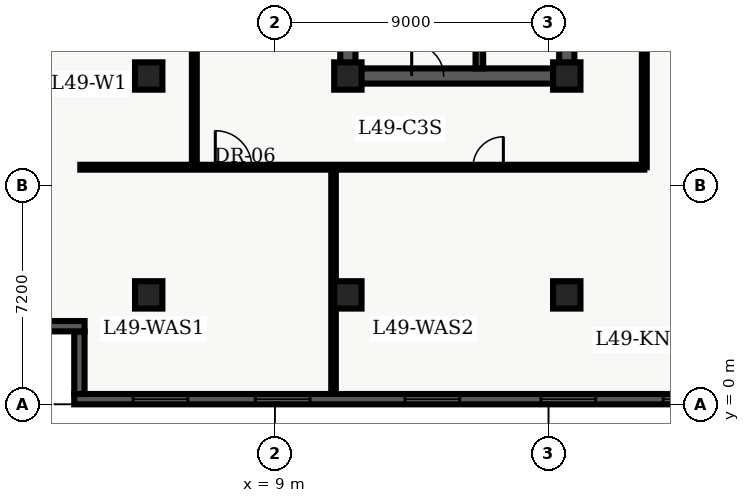
"""IFC4 building model, lengths in metres.
Left out: names, types, materials, properties, quantities, classifications, styles, units other than length and angle.
Written with IfcOpenShell. Run it as: python <this file> out.ifc"""

import sys

from ifc_helpers import new_model, entity, si_unit, converted_unit, direction, frame, origin_with_axes, origin_2d_with_axis, place, context, subcontext, project, spatial, polyline, rectangle, outline, extrude, element, fill, save


model = new_model("IFC4")
c1 = context("Model", 3, precision=1e-05, world=origin_with_axes(), true_north=direction((0.0, 1.0)))
c2 = subcontext(c1, "Body", "Model", "MODEL_VIEW")
j1 = project(units=[si_unit("LENGTHUNIT", "METRE"), converted_unit("PLANEANGLEUNIT", "DEGREE", entity("IfcPlaneAngleMeasure", 0.017), si_unit("PLANEANGLEUNIT", "RADIAN"), dimensions=[0, 0, 0, 0, 0, 0, 0])], contexts=[c1])
p1 = place(None, origin_with_axes())
s1 = spatial("IfcSite", under=j1, at=p1, CompositionType="ELEMENT")
p2 = place(p1, origin_with_axes())
s2 = spatial("IfcBuilding", under=s1, at=p2, CompositionType="ELEMENT")
p3 = place(p2, frame((0.0, 0.0, 200.4), z_axis=(0.0, 0.0, 1.0), x_axis=(1.0, 0.0, 0.0)))
s3 = spatial("IfcBuildingStorey", under=s2, at=p3, CompositionType="ELEMENT", Elevation=200.4)
p4 = place(p3, frame((11.4, 10.8, 0.0), z_axis=(0.0, 0.0, 1.0), x_axis=(0.0, 1.0, 0.0)))
e1 = element("IfcWall", 1, at=p4, inside=s3, PredefinedType="SHEAR", context=c2, shape_type="SweptSolid", body=[
    extrude(outline(polyline([(0.0, -0.25), (27.0, -0.25), (27.0, 0.25), (0.0, 0.25), (0.0, -0.25)])), origin_with_axes(), (0.0, 0.0, 1.0), 3.66),
])
p5 = place(p3, frame((11.4, 10.8, 0.0), z_axis=(0.0, 0.0, 1.0), x_axis=(1.0, 0.0, 0.0)))
e2 = element("IfcWall", 2, at=p5, inside=s3, PredefinedType="SHEAR", context=c2, shape_type="SweptSolid", body=[
    extrude(outline(polyline([(0.0, -0.25), (7.2, -0.25), (7.2, 0.25), (0.0, 0.25), (0.0, -0.25)])), origin_with_axes(), (0.0, 0.0, 1.0), 3.66),
])
p6 = place(p5, frame((2.625, 0.0, 0.0), z_axis=(0.0, 0.0, 1.0), x_axis=(1.0, 0.0, 0.0)))
e3 = element("IfcOpeningElement", 3, at=p6, cuts=e2, PredefinedType="OPENING", context=c2, shape_type="SweptSolid", body=[
    extrude(rectangle(XDim=1.05, YDim=0.52, at=origin_2d_with_axis()), origin_with_axes(), (0.0, 0.0, 1.0), 2.15),
])
p7 = place(p3, frame((18.6, 10.8, 0.0), z_axis=(0.0, 0.0, 1.0), x_axis=(0.0, 1.0, 0.0)))
e4 = element("IfcWall", 4, at=p7, inside=s3, PredefinedType="SHEAR", context=c2, shape_type="SweptSolid", body=[
    extrude(outline(polyline([(0.0, -0.25), (13.5, -0.25), (13.5, 0.25), (0.0, 0.25), (0.0, -0.25)])), origin_with_axes(), (0.0, 0.0, 1.0), 3.66),
])
p8 = place(p7, frame((11.125, 0.0, 0.0), z_axis=(0.0, 0.0, 1.0), x_axis=(1.0, 0.0, 0.0)))
e5 = element("IfcOpeningElement", 5, at=p8, cuts=e4, PredefinedType="OPENING", context=c2, shape_type="SweptSolid", body=[
    extrude(rectangle(XDim=1.05, YDim=0.52, at=origin_2d_with_axis()), origin_with_axes(), (0.0, 0.0, 1.0), 2.15),
])
p9 = place(p7, frame((4.325, 0.0, 0.0), z_axis=(0.0, 0.0, 1.0), x_axis=(1.0, 0.0, 0.0)))
e6 = element("IfcOpeningElement", 6, at=p9, cuts=e4, PredefinedType="OPENING", context=c2, shape_type="SweptSolid", body=[
    extrude(rectangle(XDim=1.05, YDim=0.52, at=origin_2d_with_axis()), origin_with_axes(), (0.0, 0.0, 1.0), 2.15),
])
p10 = place(p3, frame((15.725, 11.05, 0.0), z_axis=(0.0, 0.0, 1.0), x_axis=(0.0, 1.0, 0.0)))
e7 = element("IfcWall", 7, at=p10, inside=s3, PredefinedType="SHEAR", context=c2, shape_type="SweptSolid", body=[
    extrude(outline(polyline([(0.0, -0.125), (8.65, -0.125), (8.65, 0.125), (0.0, 0.125), (0.0, -0.125)])), origin_with_axes(), (0.0, 0.0, 1.0), 3.66),
])
for number, where, z_axis, x_axis in (
    (8, (11.4, 3.6, 0.0), (0.0, 0.0, 1.0), (1.0, 0.0, 0.0)),
    (9, (11.4, 10.8, 0.0), (0.0, 0.0, 1.0), (1.0, 0.0, 0.0)),
    (10, (18.6, 3.6, 0.0), (0.0, 0.0, 1.0), (1.0, 0.0, 0.0)),
    (11, (18.6, 10.8, 0.0), (0.0, 0.0, 1.0), (1.0, 0.0, 0.0)),
    (12, (4.85, 3.6, 0.0), (0.0, 0.0, 1.0), (1.0, 0.0, 0.0)),
    (13, (4.85, 10.8, 0.0), (0.0, 0.0, 1.0), (1.0, 0.0, 0.0)),
):
    element("IfcColumn", number, at=place(p3, frame(where, z_axis=z_axis, x_axis=x_axis)), inside=s3, PredefinedType="COLUMN", context=c2, shape_type="SweptSolid", body=[
        extrude(rectangle(XDim=0.9, YDim=0.9, at=origin_2d_with_axis()), origin_with_axes(), (0.0, 0.0, 1.0), 3.9),
    ])
p11 = place(p3, frame((2.6, 7.8, 0.0), z_axis=(0.0, 0.0, 1.0), x_axis=(1.0, 0.0, 0.0)))
e14 = element("IfcWall", 14, at=p11, inside=s3, PredefinedType="PARTITIONING", context=c2, shape_type="SweptSolid", body=[
    extrude(outline(polyline([(0.0, -0.08), (18.55, -0.08), (18.55, 0.08), (0.0, 0.08), (0.0, -0.08)])), origin_with_axes(), (0.0, 0.0, 1.0), 2.7),
])
p12 = place(p11, frame((5.04, 0.0, 0.0), z_axis=(0.0, 0.0, 1.0), x_axis=(1.0, 0.0, 0.0)))
e15 = element("IfcOpeningElement", 15, at=p12, cuts=e14, PredefinedType="OPENING", context=c2, shape_type="SweptSolid", body=[
    extrude(rectangle(XDim=1.2, YDim=0.18, at=origin_2d_with_axis()), origin_with_axes(), (0.0, 0.0, 1.0), 2.2),
])
p13 = place(p11, frame((13.415, 0.0, 0.0), z_axis=(0.0, 0.0, 1.0), x_axis=(1.0, 0.0, 0.0)))
e16 = element("IfcOpeningElement", 16, at=p13, cuts=e14, PredefinedType="OPENING", context=c2, shape_type="SweptSolid", body=[
    extrude(rectangle(XDim=1.0, YDim=0.18, at=origin_2d_with_axis()), origin_with_axes(), (0.0, 0.0, 1.0), 2.15),
])
p14 = place(p3, frame((21.15, 7.8, 0.0), z_axis=(0.0, 0.0, 1.0), x_axis=(0.0, 1.0, 0.0)))
e17 = element("IfcWall", 17, at=p14, inside=s3, PredefinedType="PARTITIONING", context=c2, shape_type="SweptSolid", body=[
    extrude(outline(polyline([(0.0, -0.08), (32.7, -0.08), (32.7, 0.08), (0.0, 0.08), (0.0, -0.08)])), origin_with_axes(), (0.0, 0.0, 1.0), 2.7),
])
p15 = place(p14, frame((15.589, 0.0, 0.0), z_axis=(0.0, 0.0, 1.0), x_axis=(1.0, 0.0, 0.0)))
e18 = element("IfcOpeningElement", 18, at=p15, cuts=e17, PredefinedType="OPENING", context=c2, shape_type="SweptSolid", body=[
    extrude(rectangle(XDim=1.0, YDim=0.18, at=origin_2d_with_axis()), origin_with_axes(), (0.0, 0.0, 1.0), 2.15),
])
p16 = place(p14, frame((19.026, 0.0, 0.0), z_axis=(0.0, 0.0, 1.0), x_axis=(1.0, 0.0, 0.0)))
e19 = element("IfcOpeningElement", 19, at=p16, cuts=e17, PredefinedType="OPENING", context=c2, shape_type="SweptSolid", body=[
    extrude(rectangle(XDim=1.0, YDim=0.18, at=origin_2d_with_axis()), origin_with_axes(), (0.0, 0.0, 1.0), 2.15),
])
p17 = place(p14, frame((22.849, 0.0, 0.0), z_axis=(0.0, 0.0, 1.0), x_axis=(1.0, 0.0, 0.0)))
e20 = element("IfcOpeningElement", 20, at=p17, cuts=e17, PredefinedType="OPENING", context=c2, shape_type="SweptSolid", body=[
    extrude(rectangle(XDim=1.0, YDim=0.18, at=origin_2d_with_axis()), origin_with_axes(), (0.0, 0.0, 1.0), 2.15),
])
p18 = place(p14, frame((27.204, 0.0, 0.0), z_axis=(0.0, 0.0, 1.0), x_axis=(1.0, 0.0, 0.0)))
e21 = element("IfcOpeningElement", 21, at=p18, cuts=e17, PredefinedType="OPENING", context=c2, shape_type="SweptSolid", body=[
    extrude(rectangle(XDim=1.0, YDim=0.18, at=origin_2d_with_axis()), origin_with_axes(), (0.0, 0.0, 1.0), 2.15),
])
p19 = place(p14, frame((31.042, 0.0, 0.0), z_axis=(0.0, 0.0, 1.0), x_axis=(1.0, 0.0, 0.0)))
e22 = element("IfcOpeningElement", 22, at=p19, cuts=e17, PredefinedType="OPENING", context=c2, shape_type="SweptSolid", body=[
    extrude(rectangle(XDim=1.0, YDim=0.18, at=origin_2d_with_axis()), origin_with_axes(), (0.0, 0.0, 1.0), 2.15),
])
p20 = place(p14, frame((5.775, 0.0, 0.0), z_axis=(0.0, 0.0, 1.0), x_axis=(1.0, 0.0, 0.0)))
e23 = element("IfcOpeningElement", 23, at=p20, cuts=e17, PredefinedType="OPENING", context=c2, shape_type="SweptSolid", body=[
    extrude(rectangle(XDim=1.05, YDim=0.18, at=origin_2d_with_axis()), origin_with_axes(), (0.0, 0.0, 1.0), 2.15),
])
p21 = place(p3, frame((6.35, 7.8, 0.0), z_axis=(0.0, 0.0, 1.0), x_axis=(0.0, 1.0, 0.0)))
e24 = element("IfcWall", 24, at=p21, inside=s3, PredefinedType="PARTITIONING", context=c2, shape_type="SweptSolid", body=[
    extrude(outline(polyline([(0.0, -0.08), (32.7, -0.08), (32.7, 0.08), (0.0, 0.08), (0.0, -0.08)])), origin_with_axes(), (0.0, 0.0, 1.0), 2.7),
])
p22 = place(p21, frame((4.415, 0.0, 0.0), z_axis=(0.0, 0.0, 1.0), x_axis=(1.0, 0.0, 0.0)))
e25 = element("IfcOpeningElement", 25, at=p22, cuts=e24, PredefinedType="OPENING", context=c2, shape_type="SweptSolid", body=[
    extrude(rectangle(XDim=1.0, YDim=0.18, at=origin_2d_with_axis()), origin_with_axes(), (0.0, 0.0, 1.0), 2.15),
])
p23 = place(p21, frame((9.986, 0.0, 0.0), z_axis=(0.0, 0.0, 1.0), x_axis=(1.0, 0.0, 0.0)))
e26 = element("IfcOpeningElement", 26, at=p23, cuts=e24, PredefinedType="OPENING", context=c2, shape_type="SweptSolid", body=[
    extrude(rectangle(XDim=1.0, YDim=0.18, at=origin_2d_with_axis()), origin_with_axes(), (0.0, 0.0, 1.0), 2.15),
])
p24 = place(p21, frame((18.332, 0.0, 0.0), z_axis=(0.0, 0.0, 1.0), x_axis=(1.0, 0.0, 0.0)))
e27 = element("IfcOpeningElement", 27, at=p24, cuts=e24, PredefinedType="OPENING", context=c2, shape_type="SweptSolid", body=[
    extrude(rectangle(XDim=1.0, YDim=0.18, at=origin_2d_with_axis()), origin_with_axes(), (0.0, 0.0, 1.0), 2.15),
])
p25 = place(p21, frame((25.088, 0.0, 0.0), z_axis=(0.0, 0.0, 1.0), x_axis=(1.0, 0.0, 0.0)))
e28 = element("IfcOpeningElement", 28, at=p25, cuts=e24, PredefinedType="OPENING", context=c2, shape_type="SweptSolid", body=[
    extrude(rectangle(XDim=1.0, YDim=0.18, at=origin_2d_with_axis()), origin_with_axes(), (0.0, 0.0, 1.0), 2.15),
])
p26 = place(p21, frame((31.177, 0.0, 0.0), z_axis=(0.0, 0.0, 1.0), x_axis=(1.0, 0.0, 0.0)))
e29 = element("IfcOpeningElement", 29, at=p26, cuts=e24, PredefinedType="OPENING", context=c2, shape_type="SweptSolid", body=[
    extrude(rectangle(XDim=1.0, YDim=0.18, at=origin_2d_with_axis()), origin_with_axes(), (0.0, 0.0, 1.0), 2.15),
])
p27 = place(p3, frame((10.929, 0.335, 0.0), z_axis=(0.0, 0.0, 1.0), x_axis=(0.0, 1.0, 0.0)))
e30 = element("IfcWall", 30, at=p27, inside=s3, PredefinedType="PARTITIONING", context=c2, shape_type="SweptSolid", body=[
    extrude(outline(polyline([(0.0, -0.075), (7.365, -0.075), (7.365, 0.075), (0.0, 0.075), (0.0, -0.075)])), origin_with_axes(), (0.0, 0.0, 1.0), 2.7),
])
p28 = place(p3, frame((57.26, 0.17, 0.0), z_axis=(0.0, 0.0, 1.0), x_axis=(-1.0, 0.0, 0.0)))
e31 = element("IfcWall", 31, at=p28, inside=s3, PredefinedType="SOLIDWALL", context=c2, shape_type="SweptSolid", body=[
    extrude(outline(polyline([(0.0, -0.17), (54.86, -0.17), (54.86, 0.17), (0.0, 0.17), (0.0, -0.17)])), origin_with_axes(), (0.0, 0.0, 1.0), 3.66),
])
p29 = place(p28, frame((2.836, 0.0, 0.45), z_axis=(0.0, 0.0, 1.0), x_axis=(1.0, 0.0, 0.0)))
e32 = element("IfcOpeningElement", 32, at=p29, cuts=e31, PredefinedType="OPENING", context=c2, shape_type="SweptSolid", body=[
    extrude(rectangle(XDim=1.8, YDim=0.36, at=origin_2d_with_axis()), origin_with_axes(), (0.0, 0.0, 1.0), 2.1),
])
p30 = place(p28, frame((7.307, 0.0, 0.45), z_axis=(0.0, 0.0, 1.0), x_axis=(1.0, 0.0, 0.0)))
e33 = element("IfcOpeningElement", 33, at=p30, cuts=e31, PredefinedType="OPENING", context=c2, shape_type="SweptSolid", body=[
    extrude(rectangle(XDim=1.8, YDim=0.36, at=origin_2d_with_axis()), origin_with_axes(), (0.0, 0.0, 1.0), 2.1),
])
p31 = place(p28, frame((11.779, 0.0, 0.45), z_axis=(0.0, 0.0, 1.0), x_axis=(1.0, 0.0, 0.0)))
e34 = element("IfcOpeningElement", 34, at=p31, cuts=e31, PredefinedType="OPENING", context=c2, shape_type="SweptSolid", body=[
    extrude(rectangle(XDim=1.8, YDim=0.36, at=origin_2d_with_axis()), origin_with_axes(), (0.0, 0.0, 1.0), 2.1),
])
p32 = place(p28, frame((16.251, 0.0, 0.45), z_axis=(0.0, 0.0, 1.0), x_axis=(1.0, 0.0, 0.0)))
e35 = element("IfcOpeningElement", 35, at=p32, cuts=e31, PredefinedType="OPENING", context=c2, shape_type="SweptSolid", body=[
    extrude(rectangle(XDim=1.8, YDim=0.36, at=origin_2d_with_axis()), origin_with_axes(), (0.0, 0.0, 1.0), 2.1),
])
p33 = place(p28, frame((20.723, 0.0, 0.45), z_axis=(0.0, 0.0, 1.0), x_axis=(1.0, 0.0, 0.0)))
e36 = element("IfcOpeningElement", 36, at=p33, cuts=e31, PredefinedType="OPENING", context=c2, shape_type="SweptSolid", body=[
    extrude(rectangle(XDim=1.8, YDim=0.36, at=origin_2d_with_axis()), origin_with_axes(), (0.0, 0.0, 1.0), 2.1),
])
p34 = place(p28, frame((34.588, 0.0, 0.45), z_axis=(0.0, 0.0, 1.0), x_axis=(1.0, 0.0, 0.0)))
e37 = element("IfcOpeningElement", 37, at=p34, cuts=e31, PredefinedType="OPENING", context=c2, shape_type="SweptSolid", body=[
    extrude(rectangle(XDim=1.8, YDim=0.36, at=origin_2d_with_axis()), origin_with_axes(), (0.0, 0.0, 1.0), 2.1),
])
p35 = place(p28, frame((38.609, 0.0, 0.45), z_axis=(0.0, 0.0, 1.0), x_axis=(1.0, 0.0, 0.0)))
e38 = element("IfcOpeningElement", 38, at=p35, cuts=e31, PredefinedType="OPENING", context=c2, shape_type="SweptSolid", body=[
    extrude(rectangle(XDim=1.8, YDim=0.36, at=origin_2d_with_axis()), origin_with_axes(), (0.0, 0.0, 1.0), 2.1),
])
p36 = place(p28, frame((43.081, 0.0, 0.45), z_axis=(0.0, 0.0, 1.0), x_axis=(1.0, 0.0, 0.0)))
e39 = element("IfcOpeningElement", 39, at=p36, cuts=e31, PredefinedType="OPENING", context=c2, shape_type="SweptSolid", body=[
    extrude(rectangle(XDim=1.8, YDim=0.36, at=origin_2d_with_axis()), origin_with_axes(), (0.0, 0.0, 1.0), 2.1),
])
p37 = place(p28, frame((48.003, 0.0, 0.45), z_axis=(0.0, 0.0, 1.0), x_axis=(1.0, 0.0, 0.0)))
e40 = element("IfcOpeningElement", 40, at=p37, cuts=e31, PredefinedType="OPENING", context=c2, shape_type="SweptSolid", body=[
    extrude(rectangle(XDim=1.8, YDim=0.36, at=origin_2d_with_axis()), origin_with_axes(), (0.0, 0.0, 1.0), 2.1),
])
p38 = place(p28, frame((52.024, 0.0, 0.45), z_axis=(0.0, 0.0, 1.0), x_axis=(1.0, 0.0, 0.0)))
e41 = element("IfcOpeningElement", 41, at=p38, cuts=e31, PredefinedType="OPENING", context=c2, shape_type="SweptSolid", body=[
    extrude(rectangle(XDim=1.8, YDim=0.36, at=origin_2d_with_axis()), origin_with_axes(), (0.0, 0.0, 1.0), 2.1),
])
p39 = place(p3, frame((2.57, 0.34, 0.0), z_axis=(0.0, 0.0, 1.0), x_axis=(0.0, 1.0, 0.0)))
e42 = element("IfcWall", 42, at=p39, inside=s3, PredefinedType="SOLIDWALL", context=c2, shape_type="SweptSolid", body=[
    extrude(outline(polyline([(0.0, -0.17), (2.06, -0.17), (2.06, 0.17), (0.0, 0.17), (0.0, -0.17)])), origin_with_axes(), (0.0, 0.0, 1.0), 3.66),
])
p40 = place(p3, frame((2.74, 2.57, 0.0), z_axis=(0.0, 0.0, 1.0), x_axis=(-1.0, 0.0, 0.0)))
e43 = element("IfcWall", 43, at=p40, inside=s3, PredefinedType="SOLIDWALL", context=c2, shape_type="SweptSolid", body=[
    extrude(outline(polyline([(0.0, -0.17), (2.74, -0.17), (2.74, 0.17), (0.0, 0.17), (0.0, -0.17)])), origin_with_axes(), (0.0, 0.0, 1.0), 3.66),
])
p41 = place(p5, frame((2.625, 0.0, 0.0), z_axis=(0.0, 0.0, 1.0), x_axis=(1.0, 0.0, 0.0)))
e44 = element("IfcDoor", 44, at=p41, inside=s3, OperationType="SINGLE_SWING_LEFT", PredefinedType="DOOR", context=c2, shape_type="SweptSolid", body=[
    extrude(rectangle(XDim=1.05, YDim=0.09, at=origin_2d_with_axis()), origin_with_axes(), (0.0, 0.0, 1.0), 2.15),
])
fill(e3, e44)
p42 = place(p11, frame((5.04, 0.0, 0.0), z_axis=(0.0, 0.0, 1.0), x_axis=(1.0, 0.0, 0.0)))
e45 = element("IfcDoor", 45, at=p42, inside=s3, OperationType="SINGLE_SWING_LEFT", PredefinedType="DOOR", context=c2, shape_type="SweptSolid", body=[
    extrude(rectangle(XDim=1.2, YDim=0.09, at=origin_2d_with_axis()), origin_with_axes(), (0.0, 0.0, 1.0), 2.2),
])
fill(e15, e45)
p43 = place(p11, frame((13.415, 0.0, 0.0), z_axis=(0.0, 0.0, 1.0), x_axis=(1.0, 0.0, 0.0)))
e46 = element("IfcDoor", 46, at=p43, inside=s3, OperationType="SINGLE_SWING_RIGHT", PredefinedType="DOOR", context=c2, shape_type="SweptSolid", body=[
    extrude(rectangle(XDim=1.0, YDim=0.09, at=origin_2d_with_axis()), origin_with_axes(), (0.0, 0.0, 1.0), 2.15),
])
fill(e16, e46)
p44 = place(p28, frame((34.588, 0.0, 0.45), z_axis=(0.0, 0.0, 1.0), x_axis=(1.0, 0.0, 0.0)))
e47 = element("IfcWindow", 47, at=p44, inside=s3, PredefinedType="WINDOW", context=c2, shape_type="SweptSolid", body=[
    extrude(rectangle(XDim=1.8, YDim=0.09, at=origin_2d_with_axis()), origin_with_axes(), (0.0, 0.0, 1.0), 2.1),
])
fill(e37, e47)
p45 = place(p28, frame((38.609, 0.0, 0.45), z_axis=(0.0, 0.0, 1.0), x_axis=(1.0, 0.0, 0.0)))
e48 = element("IfcWindow", 48, at=p45, inside=s3, PredefinedType="WINDOW", context=c2, shape_type="SweptSolid", body=[
    extrude(rectangle(XDim=1.8, YDim=0.09, at=origin_2d_with_axis()), origin_with_axes(), (0.0, 0.0, 1.0), 2.1),
])
fill(e38, e48)
p46 = place(p28, frame((43.081, 0.0, 0.45), z_axis=(0.0, 0.0, 1.0), x_axis=(1.0, 0.0, 0.0)))
e49 = element("IfcWindow", 49, at=p46, inside=s3, PredefinedType="WINDOW", context=c2, shape_type="SweptSolid", body=[
    extrude(rectangle(XDim=1.8, YDim=0.09, at=origin_2d_with_axis()), origin_with_axes(), (0.0, 0.0, 1.0), 2.1),
])
fill(e39, e49)
p47 = place(p28, frame((48.003, 0.0, 0.45), z_axis=(0.0, 0.0, 1.0), x_axis=(1.0, 0.0, 0.0)))
e50 = element("IfcWindow", 50, at=p47, inside=s3, PredefinedType="WINDOW", context=c2, shape_type="SweptSolid", body=[
    extrude(rectangle(XDim=1.8, YDim=0.09, at=origin_2d_with_axis()), origin_with_axes(), (0.0, 0.0, 1.0), 2.1),
])
fill(e40, e50)
p48 = place(p28, frame((52.024, 0.0, 0.45), z_axis=(0.0, 0.0, 1.0), x_axis=(1.0, 0.0, 0.0)))
e51 = element("IfcWindow", 51, at=p48, inside=s3, PredefinedType="WINDOW", context=c2, shape_type="SweptSolid", body=[
    extrude(rectangle(XDim=1.8, YDim=0.09, at=origin_2d_with_axis()), origin_with_axes(), (0.0, 0.0, 1.0), 2.1),
])
fill(e41, e51)
save(model, sys.argv[1])
